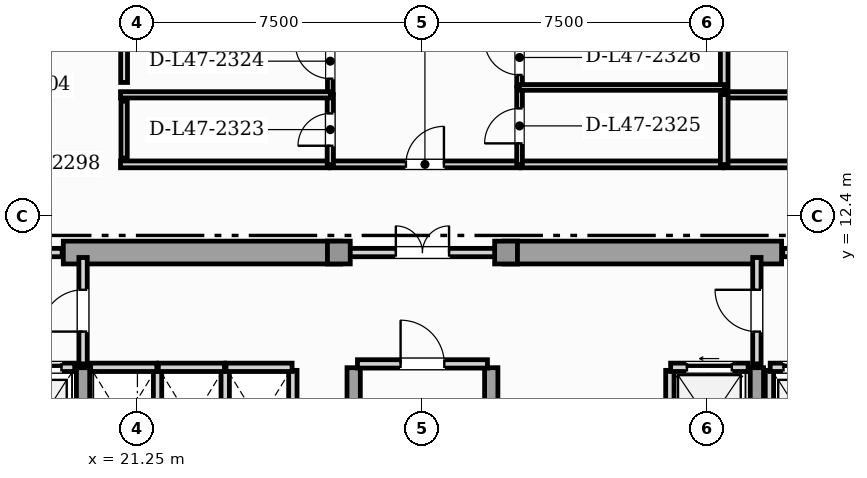
"""IFC4 building model, lengths in metres.
Left out: names, types, materials, properties, quantities, classifications, styles, units other than length and angle.
Written with IfcOpenShell. Run it as: python <this file> out.ifc"""

import sys

from ifc_helpers import new_model, si_unit, direction, frame, frame_2d, origin, origin_2d, place, context, subcontext, project, spatial, rectangle, extrude, element, fill, save


model = new_model("IFC4")
c1 = context("Model", 3, precision=1e-05, world=origin(), true_north=direction((0.0, 1.0)))
c2 = subcontext(c1, "Body", "Model", "MODEL_VIEW")
j1 = project(units=[si_unit("LENGTHUNIT", "METRE"), si_unit("PLANEANGLEUNIT", "RADIAN")], contexts=[c1])
p1 = place(None, origin())
s1 = spatial("IfcSite", under=j1, at=p1, CompositionType="ELEMENT")
p2 = place(p1, origin())
s2 = spatial("IfcBuilding", under=s1, at=p2, CompositionType="ELEMENT")
p3 = place(p2, frame((0.0, 0.0, 192.6)))
s3 = spatial("IfcBuildingStorey", under=s2, at=p3, CompositionType="ELEMENT", Elevation=192.6)
for number, where, z_axis, x_axis in (
    (1, (19.3, 11.45, 0.0), (0.0, 0.0, 1.0), (1.0, 0.0, 0.0)),
    (2, (30.9, 11.45, 0.0), (0.0, 0.0, 1.0), (1.0, 0.0, 0.0)),
):
    element("IfcWall", number, at=place(p3, frame(where, z_axis=z_axis, x_axis=x_axis)), inside=s3, PredefinedType="SHEAR", context=c2, shape_type="SweptSolid", body=[
        extrude(rectangle(XDim=7.3, YDim=0.6, at=frame_2d((3.65, 0.0))), origin(), (0.0, 0.0, 1.0), 3.63),
    ])
for number, where, z_axis, x_axis in (
    (3, (19.82, 0.92, 0.0), (0.0, 0.0, 1.0), (0.0, 1.0, 0.0)),
    (4, (26.94, 0.92, 0.0), (0.0, 0.0, 1.0), (0.0, 1.0, 0.0)),
    (5, (30.56, 0.92, 0.0), (0.0, 0.0, 1.0), (0.0, 1.0, 0.0)),
    (6, (37.55, 0.92, 0.0), (0.0, 0.0, 1.0), (0.0, 1.0, 0.0)),
):
    element("IfcWall", number, at=place(p3, frame(where, z_axis=z_axis, x_axis=x_axis)), inside=s3, PredefinedType="SHEAR", context=c2, shape_type="SweptSolid", body=[
        extrude(rectangle(XDim=7.5, YDim=0.35, at=frame_2d((3.75, 0.0))), origin(), (0.0, 0.0, 1.0), 3.63),
    ])
for number, where, z_axis, x_axis in (
    (7, (26.55, 11.45, 0.0), (0.0, 0.0, 1.0), (1.0, 0.0, 0.0)),
    (8, (30.95, 11.45, 0.0), (0.0, 0.0, 1.0), (1.0, 0.0, 0.0)),
):
    element("IfcColumn", number, at=place(p3, frame(where, z_axis=z_axis, x_axis=x_axis)), inside=s3, PredefinedType="COLUMN", context=c2, shape_type="SweptSolid", body=[
        extrude(rectangle(XDim=0.6, YDim=0.6, at=origin_2d()), origin(), (0.0, 0.0, 1.0), 3.85),
    ])
p4 = place(p3, frame((17.78, 8.43, 0.0), z_axis=(0.0, 0.0, 1.0), x_axis=(1.0, 0.0, 0.0)))
e9 = element("IfcWall", 9, at=p4, inside=s3, PredefinedType="SOLIDWALL", context=c2, shape_type="SweptSolid", body=[
    extrude(rectangle(XDim=1.82, YDim=0.22, at=frame_2d((0.91, 0.0))), origin(), (0.0, 0.0, 1.0), 3.63),
])
p5 = place(p4, frame((0.35, 0.0, 0.0)))
e10 = element("IfcOpeningElement", 10, at=p5, cuts=e9, PredefinedType="OPENING", context=c2, shape_type="SweptSolid", body=[
    extrude(rectangle(XDim=1.12, YDim=2.25, at=frame_2d((0.56, 1.125))), frame((0.0, 0.12, 0.0), z_axis=(0.0, -1.0, 0.0), x_axis=(1.0, 0.0, 0.0)), (0.0, 0.0, 1.0), 0.24),
])
p6 = place(p3, frame((37.88, 5.65, 0.0), z_axis=(0.0, 0.0, 1.0), x_axis=(0.0, 1.0, 0.0)))
e11 = element("IfcWall", 11, at=p6, inside=s3, PredefinedType="SOLIDWALL", context=c2, shape_type="SweptSolid", body=[
    extrude(rectangle(XDim=2.7, YDim=0.22, at=frame_2d((1.35, 0.0))), origin(), (0.0, 0.0, 1.0), 3.63),
])
p7 = place(p3, frame((37.9, 8.43, 0.0), z_axis=(0.0, 0.0, 1.0), x_axis=(1.0, 0.0, 0.0)))
e12 = element("IfcWall", 12, at=p7, inside=s3, PredefinedType="SOLIDWALL", context=c2, shape_type="SweptSolid", body=[
    extrude(rectangle(XDim=1.82, YDim=0.22, at=frame_2d((0.91, 0.0))), origin(), (0.0, 0.0, 1.0), 3.63),
])
p8 = place(p7, frame((0.35, 0.0, 0.0)))
e13 = element("IfcOpeningElement", 13, at=p8, cuts=e12, PredefinedType="OPENING", context=c2, shape_type="SweptSolid", body=[
    extrude(rectangle(XDim=1.12, YDim=2.25, at=frame_2d((0.56, 1.125))), frame((0.0, 0.12, 0.0), z_axis=(0.0, -1.0, 0.0), x_axis=(1.0, 0.0, 0.0)), (0.0, 0.0, 1.0), 0.24),
])
p9 = place(p3, frame((35.26, 5.65, 0.0), z_axis=(0.0, 0.0, 1.0), x_axis=(0.0, 1.0, 0.0)))
e14 = element("IfcWall", 14, at=p9, inside=s3, PredefinedType="SOLIDWALL", context=c2, shape_type="SweptSolid", body=[
    extrude(rectangle(XDim=2.7, YDim=0.22, at=frame_2d((1.35, 0.0))), origin(), (0.0, 0.0, 1.0), 3.63),
])
p10 = place(p3, frame((35.28, 8.43, 0.0), z_axis=(0.0, 0.0, 1.0), x_axis=(1.0, 0.0, 0.0)))
e15 = element("IfcWall", 15, at=p10, inside=s3, PredefinedType="SOLIDWALL", context=c2, shape_type="SweptSolid", body=[
    extrude(rectangle(XDim=2.04, YDim=0.22, at=frame_2d((1.02, 0.0))), origin(), (0.0, 0.0, 1.0), 3.63),
])
p11 = place(p10, frame((0.43, 0.0, 0.0)))
e16 = element("IfcOpeningElement", 16, at=p11, cuts=e15, PredefinedType="OPENING", context=c2, shape_type="SweptSolid", body=[
    extrude(rectangle(XDim=1.18, YDim=2.2, at=frame_2d((0.59, 1.1))), frame((0.0, 0.12, 0.0), z_axis=(0.0, -1.0, 0.0), x_axis=(1.0, 0.0, 0.0)), (0.0, 0.0, 1.0), 0.24),
])
p12 = place(p3, frame((21.78, 5.65, 0.0), z_axis=(0.0, 0.0, 1.0), x_axis=(0.0, 1.0, 0.0)))
e17 = element("IfcWall", 17, at=p12, inside=s3, PredefinedType="SOLIDWALL", context=c2, shape_type="SweptSolid", body=[
    extrude(rectangle(XDim=2.7, YDim=0.22, at=frame_2d((1.35, 0.0))), origin(), (0.0, 0.0, 1.0), 3.63),
])
p13 = place(p3, frame((20.02, 8.43, 0.0), z_axis=(0.0, 0.0, 1.0), x_axis=(1.0, 0.0, 0.0)))
e18 = element("IfcWall", 18, at=p13, inside=s3, PredefinedType="SOLIDWALL", context=c2, shape_type="SweptSolid", body=[
    extrude(rectangle(XDim=1.74, YDim=0.22, at=frame_2d((0.87, 0.0))), origin(), (0.0, 0.0, 1.0), 3.63),
])
p14 = place(p3, frame((23.56, 5.65, 0.0), z_axis=(0.0, 0.0, 1.0), x_axis=(0.0, 1.0, 0.0)))
e19 = element("IfcWall", 19, at=p14, inside=s3, PredefinedType="SOLIDWALL", context=c2, shape_type="SweptSolid", body=[
    extrude(rectangle(XDim=2.7, YDim=0.22, at=frame_2d((1.35, 0.0))), origin(), (0.0, 0.0, 1.0), 3.63),
])
p15 = place(p3, frame((21.8, 8.43, 0.0), z_axis=(0.0, 0.0, 1.0), x_axis=(1.0, 0.0, 0.0)))
e20 = element("IfcWall", 20, at=p15, inside=s3, PredefinedType="SOLIDWALL", context=c2, shape_type="SweptSolid", body=[
    extrude(rectangle(XDim=1.74, YDim=0.22, at=frame_2d((0.87, 0.0))), origin(), (0.0, 0.0, 1.0), 3.63),
])
p16 = place(p3, frame((25.34, 5.65, 0.0), z_axis=(0.0, 0.0, 1.0), x_axis=(0.0, 1.0, 0.0)))
e21 = element("IfcWall", 21, at=p16, inside=s3, PredefinedType="SOLIDWALL", context=c2, shape_type="SweptSolid", body=[
    extrude(rectangle(XDim=2.7, YDim=0.22, at=frame_2d((1.35, 0.0))), origin(), (0.0, 0.0, 1.0), 3.63),
])
p17 = place(p3, frame((23.58, 8.43, 0.0), z_axis=(0.0, 0.0, 1.0), x_axis=(1.0, 0.0, 0.0)))
e22 = element("IfcWall", 22, at=p17, inside=s3, PredefinedType="SOLIDWALL", context=c2, shape_type="SweptSolid", body=[
    extrude(rectangle(XDim=1.74, YDim=0.22, at=frame_2d((0.87, 0.0))), origin(), (0.0, 0.0, 1.0), 3.63),
])
p18 = place(p3, frame((27.04, 8.52, 0.0), z_axis=(0.0, 0.0, 1.0), x_axis=(1.0, 0.0, 0.0)))
e23 = element("IfcWall", 23, at=p18, inside=s3, PredefinedType="SOLIDWALL", context=c2, shape_type="SweptSolid", body=[
    extrude(rectangle(XDim=3.42, YDim=0.22, at=frame_2d((1.71, 0.0))), origin(), (0.0, 0.0, 1.0), 3.63),
])
p19 = place(p18, frame((1.135, 0.0, 0.0)))
e24 = element("IfcOpeningElement", 24, at=p19, cuts=e23, PredefinedType="OPENING", context=c2, shape_type="SweptSolid", body=[
    extrude(rectangle(XDim=1.15, YDim=2.2, at=frame_2d((0.575, 1.1))), frame((0.0, 0.12, 0.0), z_axis=(0.0, -1.0, 0.0), x_axis=(1.0, 0.0, 0.0)), (0.0, 0.0, 1.0), 0.24),
])
p20 = place(p3, frame((19.82, 8.52, 0.0), z_axis=(0.0, 0.0, 1.0), x_axis=(0.0, 1.0, 0.0)))
e25 = element("IfcWall", 25, at=p20, inside=s3, PredefinedType="SOLIDWALL", context=c2, shape_type="SweptSolid", body=[
    extrude(rectangle(XDim=2.8, YDim=0.22, at=frame_2d((1.4, 0.0))), origin(), (0.0, 0.0, 1.0), 3.085),
])
p21 = place(p20, frame((0.85, 0.0, 0.0)))
e26 = element("IfcOpeningElement", 26, at=p21, cuts=e25, PredefinedType="OPENING", context=c2, shape_type="SweptSolid", body=[
    extrude(rectangle(XDim=1.1, YDim=2.2, at=frame_2d((0.55, 1.1))), frame((0.0, 0.12, 0.0), z_axis=(0.0, -1.0, 0.0), x_axis=(1.0, 0.0, 0.0)), (0.0, 0.0, 1.0), 0.24),
])
p22 = place(p3, frame((37.55, 8.52, 0.0), z_axis=(0.0, 0.0, 1.0), x_axis=(0.0, 1.0, 0.0)))
e27 = element("IfcWall", 27, at=p22, inside=s3, PredefinedType="SOLIDWALL", context=c2, shape_type="SweptSolid", body=[
    extrude(rectangle(XDim=2.8, YDim=0.22, at=frame_2d((1.4, 0.0))), origin(), (0.0, 0.0, 1.0), 3.085),
])
p23 = place(p22, frame((0.85, 0.0, 0.0)))
e28 = element("IfcOpeningElement", 28, at=p23, cuts=e27, PredefinedType="OPENING", context=c2, shape_type="SweptSolid", body=[
    extrude(rectangle(XDim=1.1, YDim=2.2, at=frame_2d((0.55, 1.1))), frame((0.0, 0.12, 0.0), z_axis=(0.0, -1.0, 0.0), x_axis=(1.0, 0.0, 0.0)), (0.0, 0.0, 1.0), 0.24),
])
p24 = place(p3, frame((16.23, 11.45, 0.0), z_axis=(0.0, 0.0, 1.0), x_axis=(1.0, 0.0, 0.0)))
e29 = element("IfcWall", 29, at=p24, inside=s3, PredefinedType="SOLIDWALL", context=c2, shape_type="SweptSolid", body=[
    extrude(rectangle(XDim=3.04, YDim=0.22, at=frame_2d((1.52, 0.0))), origin(), (0.0, 0.0, 1.0), 3.63),
])
p25 = place(p24, frame((0.97, 0.0, 0.0)))
e30 = element("IfcOpeningElement", 30, at=p25, cuts=e29, PredefinedType="OPENING", context=c2, shape_type="SweptSolid", body=[
    extrude(rectangle(XDim=1.1, YDim=2.2, at=frame_2d((0.55, 1.1))), frame((0.0, 0.12, 0.0), z_axis=(0.0, -1.0, 0.0), x_axis=(1.0, 0.0, 0.0)), (0.0, 0.0, 1.0), 0.24),
])
p26 = place(p3, frame((26.63, 11.45, 0.0), z_axis=(0.0, 0.0, 1.0), x_axis=(1.0, 0.0, 0.0)))
e31 = element("IfcWall", 31, at=p26, inside=s3, PredefinedType="SOLIDWALL", context=c2, shape_type="SweptSolid", body=[
    extrude(rectangle(XDim=4.24, YDim=0.22, at=frame_2d((2.12, 0.0))), origin(), (0.0, 0.0, 1.0), 3.63),
])
p27 = place(p26, frame((1.42, 0.0, 0.0)))
e32 = element("IfcOpeningElement", 32, at=p27, cuts=e31, PredefinedType="OPENING", context=c2, shape_type="SweptSolid", body=[
    extrude(rectangle(XDim=1.4, YDim=2.2, at=frame_2d((0.7, 1.1))), frame((0.0, 0.12, 0.0), z_axis=(0.0, -1.0, 0.0), x_axis=(1.0, 0.0, 0.0)), (0.0, 0.0, 1.0), 0.24),
])
p28 = place(p3, frame((38.23, 11.45, 0.0), z_axis=(0.0, 0.0, 1.0), x_axis=(1.0, 0.0, 0.0)))
e33 = element("IfcWall", 33, at=p28, inside=s3, PredefinedType="SOLIDWALL", context=c2, shape_type="SweptSolid", body=[
    extrude(rectangle(XDim=3.04, YDim=0.22, at=frame_2d((1.52, 0.0))), origin(), (0.0, 0.0, 1.0), 3.63),
])
p29 = place(p28, frame((0.97, 0.0, 0.0)))
e34 = element("IfcOpeningElement", 34, at=p29, cuts=e33, PredefinedType="OPENING", context=c2, shape_type="SweptSolid", body=[
    extrude(rectangle(XDim=1.1, YDim=2.2, at=frame_2d((0.55, 1.1))), frame((0.0, 0.12, 0.0), z_axis=(0.0, -1.0, 0.0), x_axis=(1.0, 0.0, 0.0)), (0.0, 0.0, 1.0), 0.24),
])
p30 = place(p3, frame((36.685, 13.77, 0.0), z_axis=(0.0, 0.0, 1.0), x_axis=(1.0, 0.0, 0.0)))
e35 = element("IfcWall", 35, at=p30, inside=s3, PredefinedType="PARTITIONING", context=c2, shape_type="SweptSolid", body=[
    extrude(rectangle(XDim=4.84, YDim=0.18, at=frame_2d((2.42, 0.0))), origin(), (0.0, 0.0, 1.0), 3.63),
])
p31 = place(p3, frame((26.32, 13.77, 0.0), z_axis=(0.0, 0.0, 1.0), x_axis=(1.0, 0.0, 0.0)))
e36 = element("IfcWall", 36, at=p31, inside=s3, PredefinedType="PARTITIONING", context=c2, shape_type="SweptSolid", body=[
    extrude(rectangle(XDim=4.99, YDim=0.18, at=frame_2d((2.495, 0.0))), origin(), (0.0, 0.0, 1.0), 3.63),
])
p32 = place(p31, frame((1.995, 0.0, 0.0)))
e37 = element("IfcOpeningElement", 37, at=p32, cuts=e36, PredefinedType="OPENING", context=c2, shape_type="SweptSolid", body=[
    extrude(rectangle(XDim=1.0, YDim=2.15, at=frame_2d((0.5, 1.075))), frame((0.0, 0.1, 0.0), z_axis=(0.0, -1.0, 0.0), x_axis=(1.0, 0.0, 0.0)), (0.0, 0.0, 1.0), 0.2),
])
p33 = place(p3, frame((20.805, 13.77, 0.0), z_axis=(0.0, 0.0, 1.0), x_axis=(1.0, 0.0, 0.0)))
e38 = element("IfcWall", 38, at=p33, inside=s3, PredefinedType="PARTITIONING", context=c2, shape_type="SweptSolid", body=[
    extrude(rectangle(XDim=5.485, YDim=0.18, at=frame_2d((2.743, 0.0))), origin(), (0.0, 0.0, 1.0), 3.63),
])
p34 = place(p3, frame((31.34, 13.77, 0.0), z_axis=(0.0, 0.0, 1.0), x_axis=(1.0, 0.0, 0.0)))
e39 = element("IfcWall", 39, at=p34, inside=s3, PredefinedType="PARTITIONING", context=c2, shape_type="SweptSolid", body=[
    extrude(rectangle(XDim=5.315, YDim=0.18, at=frame_2d((2.657, 0.0))), origin(), (0.0, 0.0, 1.0), 3.63),
])
p35 = place(p3, frame((36.685, 15.6, 0.0), z_axis=(0.0, 0.0, 1.0), x_axis=(1.0, 0.0, 0.0)))
e40 = element("IfcWall", 40, at=p35, inside=s3, PredefinedType="PLUMBINGWALL", context=c2, shape_type="SweptSolid", body=[
    extrude(rectangle(XDim=4.88, YDim=0.165, at=frame_2d((2.44, 0.0))), origin(), (0.0, 0.0, 1.0), 3.63),
])
p36 = place(p3, frame((36.69, 13.765, 0.0), z_axis=(0.0, 0.0, 1.0), x_axis=(0.0, 1.0, 0.0)))
e41 = element("IfcWall", 41, at=p36, inside=s3, PredefinedType="PARTITIONING", context=c2, shape_type="SweptSolid", body=[
    extrude(rectangle(XDim=1.84, YDim=0.2, at=frame_2d((0.92, 0.0))), origin(), (0.0, 0.0, 1.0), 3.63),
])
p37 = place(p3, frame((36.69, 15.79, 0.0), z_axis=(0.0, 0.0, 1.0), x_axis=(0.0, 1.0, 0.0)))
e42 = element("IfcWall", 42, at=p37, inside=s3, PredefinedType="PARTITIONING", context=c2, shape_type="SweptSolid", body=[
    extrude(rectangle(XDim=2.042, YDim=0.2, at=frame_2d((1.021, 0.0))), origin(), (0.0, 0.0, 1.0), 3.63),
])
p38 = place(p3, frame((26.325, 13.765, 0.0), z_axis=(0.0, 0.0, 1.0), x_axis=(0.0, 1.0, 0.0)))
e43 = element("IfcWall", 43, at=p38, inside=s3, PredefinedType="PLUMBINGWALL", context=c2, shape_type="SweptSolid", body=[
    extrude(rectangle(XDim=1.84, YDim=0.165, at=frame_2d((0.92, 0.0))), origin(), (0.0, 0.0, 1.0), 3.63),
])
p39 = place(p38, frame((0.495, 0.0, 0.0)))
e44 = element("IfcOpeningElement", 44, at=p39, cuts=e43, PredefinedType="OPENING", context=c2, shape_type="SweptSolid", body=[
    extrude(rectangle(XDim=0.85, YDim=2.1, at=frame_2d((0.425, 1.05))), frame((0.0, 0.093, 0.0), z_axis=(0.0, -1.0, 0.0), x_axis=(1.0, 0.0, 0.0)), (0.0, 0.0, 1.0), 0.185),
])
p40 = place(p3, frame((26.325, 15.635, 0.0), z_axis=(0.0, 0.0, 1.0), x_axis=(0.0, 1.0, 0.0)))
e45 = element("IfcWall", 45, at=p40, inside=s3, PredefinedType="PARTITIONING", context=c2, shape_type="SweptSolid", body=[
    extrude(rectangle(XDim=1.701, YDim=0.15, at=frame_2d((0.85, 0.0))), origin(), (0.0, 0.0, 1.0), 3.63),
])
p41 = place(p40, frame((0.39, 0.0, 0.0)))
e46 = element("IfcOpeningElement", 46, at=p41, cuts=e45, PredefinedType="OPENING", context=c2, shape_type="SweptSolid", body=[
    extrude(rectangle(XDim=0.92, YDim=2.1, at=frame_2d((0.46, 1.05))), frame((0.0, 0.085, 0.0), z_axis=(0.0, -1.0, 0.0), x_axis=(1.0, 0.0, 0.0)), (0.0, 0.0, 1.0), 0.17),
])
p42 = place(p3, frame((31.305, 13.765, 0.0), z_axis=(0.0, 0.0, 1.0), x_axis=(0.0, 1.0, 0.0)))
e47 = element("IfcWall", 47, at=p42, inside=s3, PredefinedType="PARTITIONING", context=c2, shape_type="SweptSolid", body=[
    extrude(rectangle(XDim=2.035, YDim=0.15, at=frame_2d((1.017, 0.0))), origin(), (0.0, 0.0, 1.0), 3.63),
])
p43 = place(p42, frame((0.557, 0.0, 0.0)))
e48 = element("IfcOpeningElement", 48, at=p43, cuts=e47, PredefinedType="OPENING", context=c2, shape_type="SweptSolid", body=[
    extrude(rectangle(XDim=0.92, YDim=2.1, at=frame_2d((0.46, 1.05))), frame((0.0, 0.085, 0.0), z_axis=(0.0, -1.0, 0.0), x_axis=(1.0, 0.0, 0.0)), (0.0, 0.0, 1.0), 0.17),
])
p44 = place(p3, frame((31.305, 15.83, 0.0), z_axis=(0.0, 0.0, 1.0), x_axis=(0.0, 1.0, 0.0)))
e49 = element("IfcWall", 49, at=p44, inside=s3, PredefinedType="PARTITIONING", context=c2, shape_type="SweptSolid", body=[
    extrude(rectangle(XDim=1.506, YDim=0.15, at=frame_2d((0.753, 0.0))), origin(), (0.0, 0.0, 1.0), 3.63),
])
p45 = place(p44, frame((0.293, 0.0, 0.0)))
e50 = element("IfcOpeningElement", 50, at=p45, cuts=e49, PredefinedType="OPENING", context=c2, shape_type="SweptSolid", body=[
    extrude(rectangle(XDim=0.92, YDim=2.1, at=frame_2d((0.46, 1.05))), frame((0.0, 0.085, 0.0), z_axis=(0.0, -1.0, 0.0), x_axis=(1.0, 0.0, 0.0)), (0.0, 0.0, 1.0), 0.17),
])
p46 = place(p3, frame((20.805, 15.6, 0.0), z_axis=(0.0, 0.0, 1.0), x_axis=(1.0, 0.0, 0.0)))
e51 = element("IfcWall", 51, at=p46, inside=s3, PredefinedType="PLUMBINGWALL", context=c2, shape_type="SweptSolid", body=[
    extrude(rectangle(XDim=5.525, YDim=0.165, at=frame_2d((2.763, 0.0))), origin(), (0.0, 0.0, 1.0), 3.63),
])
p47 = place(p3, frame((31.3, 15.794, 0.0), z_axis=(0.0, 0.0, 1.0), x_axis=(1.0, 0.0, 0.0)))
e52 = element("IfcWall", 52, at=p47, inside=s3, PredefinedType="PARTITIONING", context=c2, shape_type="SweptSolid", body=[
    extrude(rectangle(XDim=5.395, YDim=0.15, at=frame_2d((2.697, 0.0))), origin(), (0.0, 0.0, 1.0), 3.63),
])
p48 = place(p3, frame((20.9, 13.935, 0.0), z_axis=(0.0, 0.0, 1.0), x_axis=(0.0, 1.0, 0.0)))
e53 = element("IfcWall", 53, at=p48, inside=s3, PredefinedType="PLUMBINGWALL", context=c2, shape_type="SweptSolid", body=[
    extrude(rectangle(XDim=1.5, YDim=0.165, at=frame_2d((0.75, 0.0))), origin(), (0.0, 0.0, 1.0), 3.63),
])
p49 = place(p3, frame((20.9, 15.925, 0.0), z_axis=(0.0, 0.0, 1.0), x_axis=(0.0, 1.0, 0.0)))
e54 = element("IfcWall", 54, at=p49, inside=s3, PredefinedType="PARTITIONING", context=c2, shape_type="SweptSolid", body=[
    extrude(rectangle(XDim=10.75, YDim=0.18, at=frame_2d((5.375, 0.0))), origin(), (0.0, 0.0, 1.0), 3.63),
])
p50 = place(p5, origin())
e55 = element("IfcDoor", 55, at=p50, inside=s3, OperationType="SLIDING_TO_LEFT", PredefinedType="DOOR", context=c2, shape_type="SweptSolid", body=[
    extrude(rectangle(XDim=1.12, YDim=2.25, at=frame_2d((0.56, 1.125))), frame((0.0, 0.025, 0.0), z_axis=(0.0, -1.0, 0.0), x_axis=(1.0, 0.0, 0.0)), (0.0, 0.0, 1.0), 0.05),
])
fill(e10, e55)
p51 = place(p8, origin())
e56 = element("IfcDoor", 56, at=p51, inside=s3, OperationType="SLIDING_TO_RIGHT", PredefinedType="DOOR", context=c2, shape_type="SweptSolid", body=[
    extrude(rectangle(XDim=1.12, YDim=2.25, at=frame_2d((0.56, 1.125))), frame((0.0, 0.025, 0.0), z_axis=(0.0, -1.0, 0.0), x_axis=(1.0, 0.0, 0.0)), (0.0, 0.0, 1.0), 0.05),
])
fill(e13, e56)
p52 = place(p11, origin())
e57 = element("IfcDoor", 57, at=p52, inside=s3, OperationType="SLIDING_TO_LEFT", PredefinedType="DOOR", context=c2, shape_type="SweptSolid", body=[
    extrude(rectangle(XDim=1.18, YDim=2.2, at=frame_2d((0.59, 1.1))), frame((0.0, 0.025, 0.0), z_axis=(0.0, -1.0, 0.0), x_axis=(1.0, 0.0, 0.0)), (0.0, 0.0, 1.0), 0.05),
])
fill(e16, e57)
p53 = place(p19, origin())
e58 = element("IfcDoor", 58, at=p53, inside=s3, OperationType="SINGLE_SWING_LEFT", PredefinedType="DOOR", context=c2, shape_type="SweptSolid", body=[
    extrude(rectangle(XDim=1.15, YDim=2.2, at=frame_2d((0.575, 1.1))), frame((0.0, 0.025, 0.0), z_axis=(0.0, -1.0, 0.0), x_axis=(1.0, 0.0, 0.0)), (0.0, 0.0, 1.0), 0.05),
])
fill(e24, e58)
p54 = place(p21, origin())
e59 = element("IfcDoor", 59, at=p54, inside=s3, OperationType="SINGLE_SWING_LEFT", PredefinedType="DOOR", context=c2, shape_type="SweptSolid", body=[
    extrude(rectangle(XDim=1.1, YDim=2.2, at=frame_2d((0.55, 1.1))), frame((0.0, 0.025, 0.0), z_axis=(0.0, -1.0, 0.0), x_axis=(1.0, 0.0, 0.0)), (0.0, 0.0, 1.0), 0.05),
])
fill(e26, e59)
p55 = place(p23, origin())
e60 = element("IfcDoor", 60, at=p55, inside=s3, OperationType="SINGLE_SWING_RIGHT", PredefinedType="DOOR", context=c2, shape_type="SweptSolid", body=[
    extrude(rectangle(XDim=1.1, YDim=2.2, at=frame_2d((0.55, 1.1))), frame((0.0, 0.025, 0.0), z_axis=(0.0, -1.0, 0.0), x_axis=(1.0, 0.0, 0.0)), (0.0, 0.0, 1.0), 0.05),
])
fill(e28, e60)
p56 = place(p27, origin())
e61 = element("IfcDoor", 61, at=p56, inside=s3, OperationType="DOUBLE_DOOR_SINGLE_SWING", PredefinedType="DOOR", context=c2, shape_type="SweptSolid", body=[
    extrude(rectangle(XDim=1.4, YDim=2.2, at=frame_2d((0.7, 1.1))), frame((0.0, 0.025, 0.0), z_axis=(0.0, -1.0, 0.0), x_axis=(1.0, 0.0, 0.0)), (0.0, 0.0, 1.0), 0.05),
])
fill(e32, e61)
p57 = place(p32, origin())
e62 = element("IfcDoor", 62, at=p57, inside=s3, OperationType="SINGLE_SWING_RIGHT", PredefinedType="DOOR", context=c2, shape_type="SweptSolid", body=[
    extrude(rectangle(XDim=1.0, YDim=2.15, at=frame_2d((0.5, 1.075))), frame((0.0, 0.025, 0.0), z_axis=(0.0, -1.0, 0.0), x_axis=(1.0, 0.0, 0.0)), (0.0, 0.0, 1.0), 0.05),
])
fill(e37, e62)
p58 = place(p39, origin())
e63 = element("IfcDoor", 63, at=p58, inside=s3, OperationType="SINGLE_SWING_LEFT", PredefinedType="DOOR", context=c2, shape_type="SweptSolid", body=[
    extrude(rectangle(XDim=0.85, YDim=2.1, at=frame_2d((0.425, 1.05))), frame((0.0, 0.025, 0.0), z_axis=(0.0, -1.0, 0.0), x_axis=(1.0, 0.0, 0.0)), (0.0, 0.0, 1.0), 0.05),
])
fill(e44, e63)
p59 = place(p41, origin())
e64 = element("IfcDoor", 64, at=p59, inside=s3, OperationType="SINGLE_SWING_RIGHT", PredefinedType="DOOR", context=c2, shape_type="SweptSolid", body=[
    extrude(rectangle(XDim=0.92, YDim=2.1, at=frame_2d((0.46, 1.05))), frame((0.0, 0.025, 0.0), z_axis=(0.0, -1.0, 0.0), x_axis=(1.0, 0.0, 0.0)), (0.0, 0.0, 1.0), 0.05),
])
fill(e46, e64)
p60 = place(p43, origin())
e65 = element("IfcDoor", 65, at=p60, inside=s3, OperationType="SINGLE_SWING_LEFT", PredefinedType="DOOR", context=c2, shape_type="SweptSolid", body=[
    extrude(rectangle(XDim=0.92, YDim=2.1, at=frame_2d((0.46, 1.05))), frame((0.0, 0.025, 0.0), z_axis=(0.0, -1.0, 0.0), x_axis=(1.0, 0.0, 0.0)), (0.0, 0.0, 1.0), 0.05),
])
fill(e48, e65)
p61 = place(p45, origin())
e66 = element("IfcDoor", 66, at=p61, inside=s3, OperationType="SINGLE_SWING_RIGHT", PredefinedType="DOOR", context=c2, shape_type="SweptSolid", body=[
    extrude(rectangle(XDim=0.92, YDim=2.1, at=frame_2d((0.46, 1.05))), frame((0.0, 0.025, 0.0), z_axis=(0.0, -1.0, 0.0), x_axis=(1.0, 0.0, 0.0)), (0.0, 0.0, 1.0), 0.05),
])
fill(e50, e66)
save(model, sys.argv[1])
